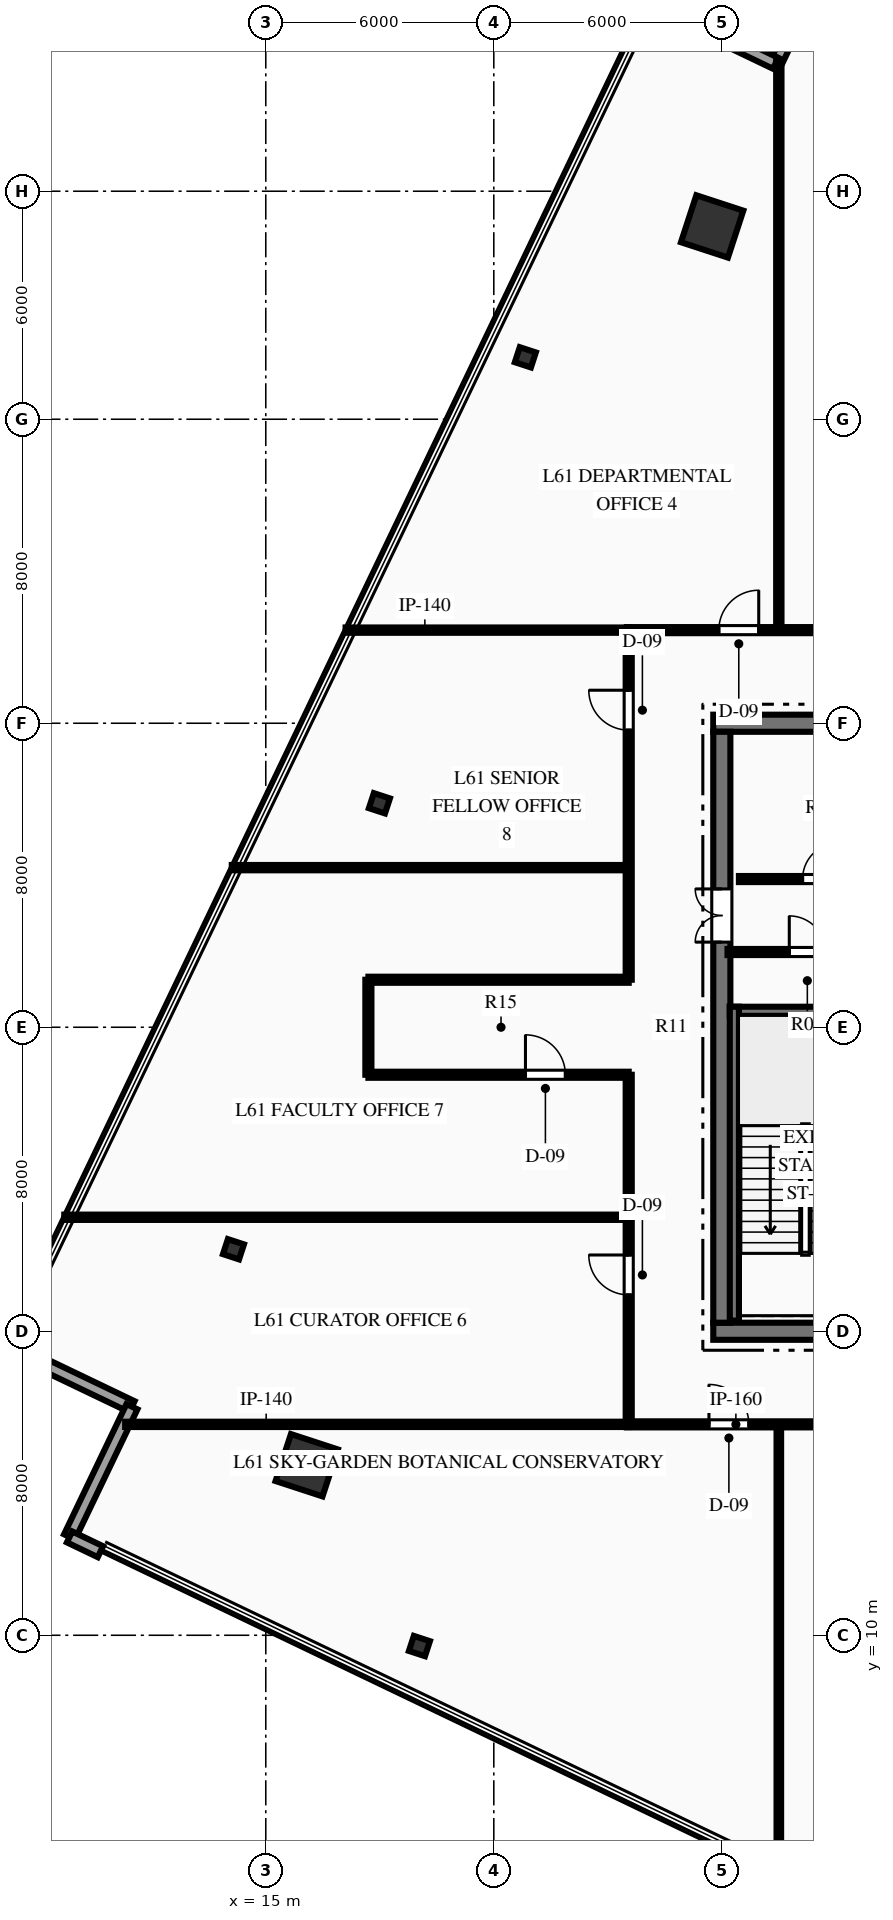
"""IFC4 building model, lengths in metres.
Left out: names, types, materials, properties, quantities, classifications, styles, units other than length and angle.
Written with IfcOpenShell. Run it as: python <this file> out.ifc"""

import sys

from ifc_helpers import new_model, si_unit, direction, frame, frame_2d, origin, origin_2d, place, context, subcontext, project, spatial, rectangle, hollow_rectangle, i_section, extrude, element, fill, save


model = new_model("IFC4")
c1 = context("Model", 3, precision=1e-05, world=origin(), true_north=direction((0.0, 1.0)))
c2 = subcontext(c1, "Body", "Model", "MODEL_VIEW")
j1 = project(units=[si_unit("LENGTHUNIT", "METRE"), si_unit("PLANEANGLEUNIT", "RADIAN")], contexts=[c1])
p1 = place(None, origin())
s1 = spatial("IfcSite", under=j1, at=p1, CompositionType="ELEMENT")
p2 = place(p1, origin())
s2 = spatial("IfcBuilding", under=s1, at=p2, CompositionType="ELEMENT")
p3 = place(p2, frame((0.0, 0.0, 244.2)))
s3 = spatial("IfcBuildingStorey", under=s2, at=p3, CompositionType="ELEMENT", Elevation=244.2)
p4 = place(p3, frame((26.775, 18.0, 0.0), z_axis=(0.0, 0.0, 1.0), x_axis=(1.0, 0.0, 0.0)))
e1 = element("IfcWall", 1, at=p4, inside=s3, PredefinedType="SHEAR", context=c2, shape_type="SweptSolid", body=[
    extrude(rectangle(XDim=18.45, YDim=0.45, at=frame_2d((9.225, 0.0))), origin(), (0.0, 0.0, 1.0), 4.5),
])
p5 = place(p4, frame((7.325, 0.0, 0.0)))
e2 = element("IfcOpeningElement", 2, at=p5, cuts=e1, PredefinedType="OPENING", context=c2, shape_type="SweptSolid", body=[
    extrude(rectangle(XDim=1.1, YDim=2.15, at=frame_2d((0.55, 1.075))), frame((0.0, 0.235, 0.0), z_axis=(0.0, -1.0, 0.0), x_axis=(1.0, 0.0, 0.0)), (0.0, 0.0, 1.0), 0.47),
])
p6 = place(p4, frame((10.025, 0.0, 0.0)))
e3 = element("IfcOpeningElement", 3, at=p6, cuts=e1, PredefinedType="OPENING", context=c2, shape_type="SweptSolid", body=[
    extrude(rectangle(XDim=1.1, YDim=2.15, at=frame_2d((0.55, 1.075))), frame((0.0, 0.235, 0.0), z_axis=(0.0, -1.0, 0.0), x_axis=(1.0, 0.0, 0.0)), (0.0, 0.0, 1.0), 0.47),
])
p7 = place(p3, frame((26.775, 34.0, 0.0), z_axis=(0.0, 0.0, 1.0), x_axis=(1.0, 0.0, 0.0)))
e4 = element("IfcWall", 4, at=p7, inside=s3, PredefinedType="SHEAR", context=c2, shape_type="SweptSolid", body=[
    extrude(rectangle(XDim=18.45, YDim=0.45, at=frame_2d((9.225, 0.0))), origin(), (0.0, 0.0, 1.0), 4.5),
])
p8 = place(p3, frame((27.0, 18.225, 0.0), z_axis=(0.0, 0.0, 1.0), x_axis=(0.0, 1.0, 0.0)))
e5 = element("IfcWall", 5, at=p8, inside=s3, PredefinedType="SHEAR", context=c2, shape_type="SweptSolid", body=[
    extrude(rectangle(XDim=15.55, YDim=0.45, at=frame_2d((7.775, 0.0))), origin(), (0.0, 0.0, 1.0), 4.5),
])
p9 = place(p8, frame((10.015, 0.0, 0.0)))
e6 = element("IfcOpeningElement", 6, at=p9, cuts=e5, PredefinedType="OPENING", context=c2, shape_type="SweptSolid", body=[
    extrude(rectangle(XDim=1.4, YDim=2.2, at=frame_2d((0.7, 1.1))), frame((0.0, 0.235, 0.0), z_axis=(0.0, -1.0, 0.0), x_axis=(1.0, 0.0, 0.0)), (0.0, 0.0, 1.0), 0.47),
])
p10 = place(p3, frame((27.21, 26.42, 0.0), z_axis=(0.0, 0.0, 1.0), x_axis=(1.0, 0.0, 0.0)))
e7 = element("IfcWall", 7, at=p10, inside=s3, PredefinedType="SHEAR", context=c2, shape_type="SweptSolid", body=[
    extrude(rectangle(XDim=3.98, YDim=0.24, at=frame_2d((1.99, 0.0))), origin(), (0.0, 0.0, 1.0), 4.5),
])
p11 = place(p3, frame((27.33, 18.28, 0.0), z_axis=(0.0, 0.0, 1.0), x_axis=(0.0, 1.0, 0.0)))
e8 = element("IfcWall", 8, at=p11, inside=s3, PredefinedType="SHEAR", context=c2, shape_type="SweptSolid", body=[
    extrude(rectangle(XDim=8.26, YDim=0.24, at=frame_2d((4.13, 0.0))), origin(), (0.0, 0.0, 1.0), 4.5),
])
for number, where, z_axis, x_axis in (
    (9, (26.745, 47.073, 0.0), (0.0, 0.0, 1.0), (0.311, 0.95, 0.0)),
    (10, (16.077, 14.475, 0.0), (0.0, 0.0, 1.0), (0.311, 0.95, 0.0)),
):
    element("IfcColumn", number, at=place(p3, frame(where, z_axis=z_axis, x_axis=x_axis)), inside=s3, PredefinedType="COLUMN", context=c2, shape_type="SweptSolid", body=[
        extrude(hollow_rectangle(XDim=1.3, YDim=1.3, WallThickness=0.06, at=origin_2d()), origin(), (0.0, 0.0, 1.0), 4.5),
    ])
for number, where, z_axis, x_axis in (
    (11, (21.83, 43.629, 0.0), (0.0, 0.0, 1.0), (0.311, 0.95, 0.0)),
    (12, (17.99, 31.894, 0.0), (0.0, 0.0, 1.0), (0.311, 0.95, 0.0)),
    (13, (14.149, 20.158, 0.0), (0.0, 0.0, 1.0), (0.311, 0.95, 0.0)),
    (14, (19.043, 9.716, 0.0), (0.0, 0.0, 1.0), (0.311, 0.95, 0.0)),
):
    element("IfcColumn", number, at=place(p3, frame(where, z_axis=z_axis, x_axis=x_axis)), inside=s3, PredefinedType="COLUMN", context=c2, shape_type="SweptSolid", body=[
        extrude(i_section(OverallWidth=0.416, OverallDepth=0.445, WebThickness=0.039, FlangeThickness=0.063, at=origin_2d()), origin(), (0.0, 0.0, 1.0), 4.5),
    ])
p12 = place(p3, frame((28.416, 51.367, 0.0), z_axis=(0.0, 0.0, 1.0), x_axis=(0.432064663211, 0.901842628624, 0.0)))
e15 = element("IfcWall", 15, at=p12, inside=s3, PredefinedType="STANDARD", context=c2, shape_type="SweptSolid", body=[
    extrude(rectangle(XDim=3.8, YDim=0.32, at=frame_2d((1.9, 0.0))), origin(), (0.0, 0.0, 1.0), 4.23),
])
p13 = place(p3, frame((24.989, 53.009, 0.0), z_axis=(0.0, 0.0, 1.0), x_axis=(0.901817593476, -0.432116914848, 0.0)))
e16 = element("IfcWall", 16, at=p13, inside=s3, PredefinedType="STANDARD", context=c2, shape_type="SweptSolid", body=[
    extrude(rectangle(XDim=3.8, YDim=0.32, at=frame_2d((1.9, 0.0))), origin(), (0.0, 0.0, 1.0), 4.23),
])
p14 = place(p13, frame((1.05, 0.0, 0.75)))
e17 = element("IfcOpeningElement", 17, at=p14, cuts=e16, PredefinedType="OPENING", context=c2, shape_type="SweptSolid", body=[
    extrude(rectangle(XDim=1.7, YDim=2.5, at=frame_2d((0.85, 1.25))), frame((0.0, 0.17, 0.0), z_axis=(0.0, -1.0, 0.0), x_axis=(1.0, 0.0, 0.0)), (0.0, 0.0, 1.0), 0.34),
])
for number, where, z_axis, x_axis in (
    (18, (11.479, 16.015, 0.0), (0.0, 0.0, 1.0), (-0.902, 0.432, 0.0)),
    (19, (9.837, 12.588, 0.0), (0.0, 0.0, 1.0), (0.432, 0.902, 0.0)),
):
    element("IfcWall", number, at=place(p3, frame(where, z_axis=z_axis, x_axis=x_axis)), inside=s3, PredefinedType="STANDARD", context=c2, shape_type="SweptSolid", body=[
        extrude(rectangle(XDim=3.8, YDim=0.32, at=frame_2d((1.9, 0.0))), origin(), (0.0, 0.0, 1.0), 4.23),
    ])
p15 = place(p3, frame((10.648, 12.199, 0.0), z_axis=(0.0, 0.0, 1.0), x_axis=(-0.901789596457, 0.432175339096, 0.0)))
e20 = element("IfcWall", 20, at=p15, inside=s3, PredefinedType="STANDARD", context=c2, shape_type="SweptSolid", body=[
    extrude(rectangle(XDim=0.9, YDim=0.32, at=frame_2d((0.45, 0.0))), origin(), (0.0, 0.0, 1.0), 4.23),
])
p16 = place(p3, frame((27.15, 27.98, 0.0), z_axis=(0.0, 0.0, 1.0), x_axis=(1.0, 0.0, 0.0)))
e21 = element("IfcWall", 21, at=p16, inside=s3, PredefinedType="PARTITIONING", context=c2, shape_type="SweptSolid", body=[
    extrude(rectangle(XDim=4.05, YDim=0.16, at=frame_2d((2.025, 0.0))), origin(), (0.0, 0.0, 1.0), 4.23),
])
p17 = place(p16, frame((1.625, 0.0, 0.0)))
e22 = element("IfcOpeningElement", 22, at=p17, cuts=e21, PredefinedType="OPENING", context=c2, shape_type="SweptSolid", body=[
    extrude(rectangle(XDim=0.95, YDim=2.15, at=frame_2d((0.475, 1.075))), frame((0.0, 0.09, 0.0), z_axis=(0.0, -1.0, 0.0), x_axis=(1.0, 0.0, 0.0)), (0.0, 0.0, 1.0), 0.18),
])
p18 = place(p3, frame((27.45, 29.9, 0.0), z_axis=(0.0, 0.0, 1.0), x_axis=(1.0, 0.0, 0.0)))
e23 = element("IfcWall", 23, at=p18, inside=s3, PredefinedType="PARTITIONING", context=c2, shape_type="SweptSolid", body=[
    extrude(rectangle(XDim=4.43, YDim=0.16, at=frame_2d((2.215, 0.0))), origin(), (0.0, 0.0, 1.0), 4.23),
])
p19 = place(p18, frame((1.675, 0.0, 0.0)))
e24 = element("IfcOpeningElement", 24, at=p19, cuts=e23, PredefinedType="OPENING", context=c2, shape_type="SweptSolid", body=[
    extrude(rectangle(XDim=0.95, YDim=2.15, at=frame_2d((0.475, 1.075))), frame((0.0, 0.09, 0.0), z_axis=(0.0, -1.0, 0.0), x_axis=(1.0, 0.0, 0.0)), (0.0, 0.0, 1.0), 0.18),
])
p20 = place(p3, frame((24.5, 15.55, 0.0), z_axis=(0.0, 0.0, 1.0), x_axis=(1.0, 0.0, 0.0)))
e25 = element("IfcWall", 25, at=p20, inside=s3, PredefinedType="PARTITIONING", context=c2, shape_type="SweptSolid", body=[
    extrude(rectangle(XDim=10.25, YDim=0.16, at=frame_2d((5.125, 0.0))), origin(), (0.0, 0.0, 1.0), 4.23),
])
p21 = place(p20, frame((2.161, 0.0, 0.0)))
e26 = element("IfcOpeningElement", 26, at=p21, cuts=e25, PredefinedType="OPENING", context=c2, shape_type="SweptSolid", body=[
    extrude(rectangle(XDim=1.05, YDim=2.15, at=frame_2d((0.525, 1.075))), frame((0.0, 0.09, 0.0), z_axis=(0.0, -1.0, 0.0), x_axis=(1.0, 0.0, 0.0)), (0.0, 0.0, 1.0), 0.18),
])
p22 = place(p20, frame((7.619, 0.0, 0.0)))
e27 = element("IfcOpeningElement", 27, at=p22, cuts=e25, PredefinedType="OPENING", context=c2, shape_type="SweptSolid", body=[
    extrude(rectangle(XDim=1.05, YDim=2.15, at=frame_2d((0.525, 1.075))), frame((0.0, 0.09, 0.0), z_axis=(0.0, -1.0, 0.0), x_axis=(1.0, 0.0, 0.0)), (0.0, 0.0, 1.0), 0.18),
])
p23 = place(p3, frame((24.5, 36.45, 0.0), z_axis=(0.0, 0.0, 1.0), x_axis=(1.0, 0.0, 0.0)))
e28 = element("IfcWall", 28, at=p23, inside=s3, PredefinedType="PARTITIONING", context=c2, shape_type="SweptSolid", body=[
    extrude(rectangle(XDim=10.25, YDim=0.16, at=frame_2d((5.125, 0.0))), origin(), (0.0, 0.0, 1.0), 4.23),
])
p24 = place(p23, frame((2.421, 0.0, 0.0)))
e29 = element("IfcOpeningElement", 29, at=p24, cuts=e28, PredefinedType="OPENING", context=c2, shape_type="SweptSolid", body=[
    extrude(rectangle(XDim=1.05, YDim=2.15, at=frame_2d((0.525, 1.075))), frame((0.0, 0.09, 0.0), z_axis=(0.0, -1.0, 0.0), x_axis=(1.0, 0.0, 0.0)), (0.0, 0.0, 1.0), 0.18),
])
p25 = place(p23, frame((7.619, 0.0, 0.0)))
e30 = element("IfcOpeningElement", 30, at=p25, cuts=e28, PredefinedType="OPENING", context=c2, shape_type="SweptSolid", body=[
    extrude(rectangle(XDim=1.05, YDim=2.15, at=frame_2d((0.525, 1.075))), frame((0.0, 0.09, 0.0), z_axis=(0.0, -1.0, 0.0), x_axis=(1.0, 0.0, 0.0)), (0.0, 0.0, 1.0), 0.18),
])
p26 = place(p3, frame((24.55, 15.55, 0.0), z_axis=(0.0, 0.0, 1.0), x_axis=(0.0, 1.0, 0.0)))
e31 = element("IfcWall", 31, at=p26, inside=s3, PredefinedType="PARTITIONING", context=c2, shape_type="SweptSolid", body=[
    extrude(rectangle(XDim=9.2, YDim=0.16, at=frame_2d((4.6, 0.0))), origin(), (0.0, 0.0, 1.0), 4.23),
])
p27 = place(p26, frame((3.407, 0.0, 0.0)))
e32 = element("IfcOpeningElement", 32, at=p27, cuts=e31, PredefinedType="OPENING", context=c2, shape_type="SweptSolid", body=[
    extrude(rectangle(XDim=1.05, YDim=2.15, at=frame_2d((0.525, 1.075))), frame((0.0, 0.09, 0.0), z_axis=(0.0, -1.0, 0.0), x_axis=(1.0, 0.0, 0.0)), (0.0, 0.0, 1.0), 0.18),
])
p28 = place(p3, frame((24.55, 27.25, 0.0), z_axis=(0.0, 0.0, 1.0), x_axis=(0.0, 1.0, 0.0)))
e33 = element("IfcWall", 33, at=p28, inside=s3, PredefinedType="PARTITIONING", context=c2, shape_type="SweptSolid", body=[
    extrude(rectangle(XDim=9.2, YDim=0.16, at=frame_2d((4.6, 0.0))), origin(), (0.0, 0.0, 1.0), 4.23),
])
p29 = place(p28, frame((6.569, 0.0, 0.0)))
e34 = element("IfcOpeningElement", 34, at=p29, cuts=e33, PredefinedType="OPENING", context=c2, shape_type="SweptSolid", body=[
    extrude(rectangle(XDim=1.05, YDim=2.15, at=frame_2d((0.525, 1.075))), frame((0.0, 0.09, 0.0), z_axis=(0.0, -1.0, 0.0), x_axis=(1.0, 0.0, 0.0)), (0.0, 0.0, 1.0), 0.18),
])
p30 = place(p3, frame((17.7, 24.75, 0.0), z_axis=(0.0, 0.0, 1.0), x_axis=(1.0, 0.0, 0.0)))
e35 = element("IfcWall", 35, at=p30, inside=s3, PredefinedType="PARTITIONING", context=c2, shape_type="SweptSolid", body=[
    extrude(rectangle(XDim=6.85, YDim=0.16, at=frame_2d((3.425, 0.0))), origin(), (0.0, 0.0, 1.0), 4.23),
])
p31 = place(p30, frame((4.133, 0.0, 0.0)))
e36 = element("IfcOpeningElement", 36, at=p31, cuts=e35, PredefinedType="OPENING", context=c2, shape_type="SweptSolid", body=[
    extrude(rectangle(XDim=1.05, YDim=2.15, at=frame_2d((0.525, 1.075))), frame((0.0, 0.09, 0.0), z_axis=(0.0, -1.0, 0.0), x_axis=(1.0, 0.0, 0.0)), (0.0, 0.0, 1.0), 0.18),
])
p32 = place(p3, frame((17.7, 27.25, 0.0), z_axis=(0.0, 0.0, 1.0), x_axis=(1.0, 0.0, 0.0)))
e37 = element("IfcWall", 37, at=p32, inside=s3, PredefinedType="PARTITIONING", context=c2, shape_type="SweptSolid", body=[
    extrude(rectangle(XDim=6.85, YDim=0.16, at=frame_2d((3.425, 0.0))), origin(), (0.0, 0.0, 1.0), 4.23),
])
p33 = place(p3, frame((17.7, 24.75, 0.0), z_axis=(0.0, 0.0, 1.0), x_axis=(0.0, 1.0, 0.0)))
e38 = element("IfcWall", 38, at=p33, inside=s3, PredefinedType="PARTITIONING", context=c2, shape_type="SweptSolid", body=[
    extrude(rectangle(XDim=2.5, YDim=0.16, at=frame_2d((1.25, 0.0))), origin(), (0.0, 0.0, 1.0), 4.23),
])
p34 = place(p3, frame((11.3, 15.55, 0.0), z_axis=(0.0, 0.0, 1.0), x_axis=(1.0, 0.0, 0.0)))
e39 = element("IfcWall", 39, at=p34, inside=s3, PredefinedType="PARTITIONING", context=c2, shape_type="SweptSolid", body=[
    extrude(rectangle(XDim=13.25, YDim=0.14, at=frame_2d((6.625, 0.0))), origin(), (0.0, 0.0, 1.0), 3.608),
])
p35 = place(p3, frame((17.1, 36.45, 0.0), z_axis=(0.0, 0.0, 1.0), x_axis=(1.0, 0.0, 0.0)))
e40 = element("IfcWall", 40, at=p35, inside=s3, PredefinedType="PARTITIONING", context=c2, shape_type="SweptSolid", body=[
    extrude(rectangle(XDim=7.45, YDim=0.14, at=frame_2d((3.725, 0.0))), origin(), (0.0, 0.0, 1.0), 4.23),
])
p36 = place(p3, frame((28.5, 3.691, 0.0), z_axis=(0.0, 0.0, 1.0), x_axis=(0.0, 1.0, 0.0)))
e41 = element("IfcWall", 41, at=p36, inside=s3, PredefinedType="PARTITIONING", context=c2, shape_type="SweptSolid", body=[
    extrude(rectangle(XDim=11.859, YDim=0.12, at=frame_2d((5.93, 0.0))), origin(), (0.0, 0.0, 1.0), 4.23),
])
p37 = place(p3, frame((28.5, 36.45, 0.0), z_axis=(0.0, 0.0, 1.0), x_axis=(0.0, 1.0, 0.0)))
e42 = element("IfcWall", 42, at=p37, inside=s3, PredefinedType="PARTITIONING", context=c2, shape_type="SweptSolid", body=[
    extrude(rectangle(XDim=14.999, YDim=0.14, at=frame_2d((7.5, 0.0))), origin(), (0.0, 0.0, 1.0), 4.23),
])
p38 = place(p3, frame((9.698, 21.0, 0.0), z_axis=(0.0, 0.0, 1.0), x_axis=(1.0, 0.0, 0.0)))
e43 = element("IfcWall", 43, at=p38, inside=s3, PredefinedType="PARTITIONING", context=c2, shape_type="SweptSolid", body=[
    extrude(rectangle(XDim=14.853, YDim=0.14, at=frame_2d((7.426, 0.0))), origin(), (0.0, 0.0, 1.0), 4.23),
])
p39 = place(p3, frame((14.105, 30.2, 0.0), z_axis=(0.0, 0.0, 1.0), x_axis=(1.0, 0.0, 0.0)))
e44 = element("IfcWall", 44, at=p39, inside=s3, PredefinedType="PARTITIONING", context=c2, shape_type="SweptSolid", body=[
    extrude(rectangle(XDim=10.445, YDim=0.14, at=frame_2d((5.222, 0.0))), origin(), (0.0, 0.0, 1.0), 4.23),
])
p40 = place(p17, origin())
e45 = element("IfcDoor", 45, at=p40, inside=s3, OperationType="SINGLE_SWING_LEFT", PredefinedType="DOOR", context=c2, shape_type="SweptSolid", body=[
    extrude(rectangle(XDim=0.95, YDim=2.15, at=frame_2d((0.475, 1.075))), frame((0.0, 0.025, 0.0), z_axis=(0.0, -1.0, 0.0), x_axis=(1.0, 0.0, 0.0)), (0.0, 0.0, 1.0), 0.05),
])
fill(e22, e45)
p41 = place(p19, origin())
e46 = element("IfcDoor", 46, at=p41, inside=s3, OperationType="SINGLE_SWING_RIGHT", PredefinedType="DOOR", context=c2, shape_type="SweptSolid", body=[
    extrude(rectangle(XDim=0.95, YDim=2.15, at=frame_2d((0.475, 1.075))), frame((0.0, 0.025, 0.0), z_axis=(0.0, -1.0, 0.0), x_axis=(1.0, 0.0, 0.0)), (0.0, 0.0, 1.0), 0.05),
])
fill(e24, e46)
p42 = place(p9, origin())
e47 = element("IfcDoor", 47, at=p42, inside=s3, OperationType="DOUBLE_DOOR_SINGLE_SWING", PredefinedType="DOOR", context=c2, shape_type="SweptSolid", body=[
    extrude(rectangle(XDim=1.4, YDim=2.2, at=frame_2d((0.7, 1.1))), frame((0.0, 0.025, 0.0), z_axis=(0.0, -1.0, 0.0), x_axis=(1.0, 0.0, 0.0)), (0.0, 0.0, 1.0), 0.05),
])
fill(e6, e47)
p43 = place(p21, origin())
e48 = element("IfcDoor", 48, at=p43, inside=s3, OperationType="SINGLE_SWING_LEFT", PredefinedType="DOOR", context=c2, shape_type="SweptSolid", body=[
    extrude(rectangle(XDim=1.05, YDim=2.15, at=frame_2d((0.525, 1.075))), frame((0.0, 0.025, 0.0), z_axis=(0.0, -1.0, 0.0), x_axis=(1.0, 0.0, 0.0)), (0.0, 0.0, 1.0), 0.05),
])
fill(e26, e48)
p44 = place(p24, origin())
e49 = element("IfcDoor", 49, at=p44, inside=s3, OperationType="SINGLE_SWING_RIGHT", PredefinedType="DOOR", context=c2, shape_type="SweptSolid", body=[
    extrude(rectangle(XDim=1.05, YDim=2.15, at=frame_2d((0.525, 1.075))), frame((0.0, 0.025, 0.0), z_axis=(0.0, -1.0, 0.0), x_axis=(1.0, 0.0, 0.0)), (0.0, 0.0, 1.0), 0.05),
])
fill(e29, e49)
p45 = place(p27, origin())
e50 = element("IfcDoor", 50, at=p45, inside=s3, OperationType="SINGLE_SWING_RIGHT", PredefinedType="DOOR", context=c2, shape_type="SweptSolid", body=[
    extrude(rectangle(XDim=1.05, YDim=2.15, at=frame_2d((0.525, 1.075))), frame((0.0, 0.025, 0.0), z_axis=(0.0, -1.0, 0.0), x_axis=(1.0, 0.0, 0.0)), (0.0, 0.0, 1.0), 0.05),
])
fill(e32, e50)
p46 = place(p31, origin())
e51 = element("IfcDoor", 51, at=p46, inside=s3, OperationType="SINGLE_SWING_LEFT", PredefinedType="DOOR", context=c2, shape_type="SweptSolid", body=[
    extrude(rectangle(XDim=1.05, YDim=2.15, at=frame_2d((0.525, 1.075))), frame((0.0, 0.025, 0.0), z_axis=(0.0, -1.0, 0.0), x_axis=(1.0, 0.0, 0.0)), (0.0, 0.0, 1.0), 0.05),
])
fill(e36, e51)
p47 = place(p29, origin())
e52 = element("IfcDoor", 52, at=p47, inside=s3, OperationType="SINGLE_SWING_RIGHT", PredefinedType="DOOR", context=c2, shape_type="SweptSolid", body=[
    extrude(rectangle(XDim=1.05, YDim=2.15, at=frame_2d((0.525, 1.075))), frame((0.0, 0.025, 0.0), z_axis=(0.0, -1.0, 0.0), x_axis=(1.0, 0.0, 0.0)), (0.0, 0.0, 1.0), 0.05),
])
fill(e34, e52)
save(model, sys.argv[1])
